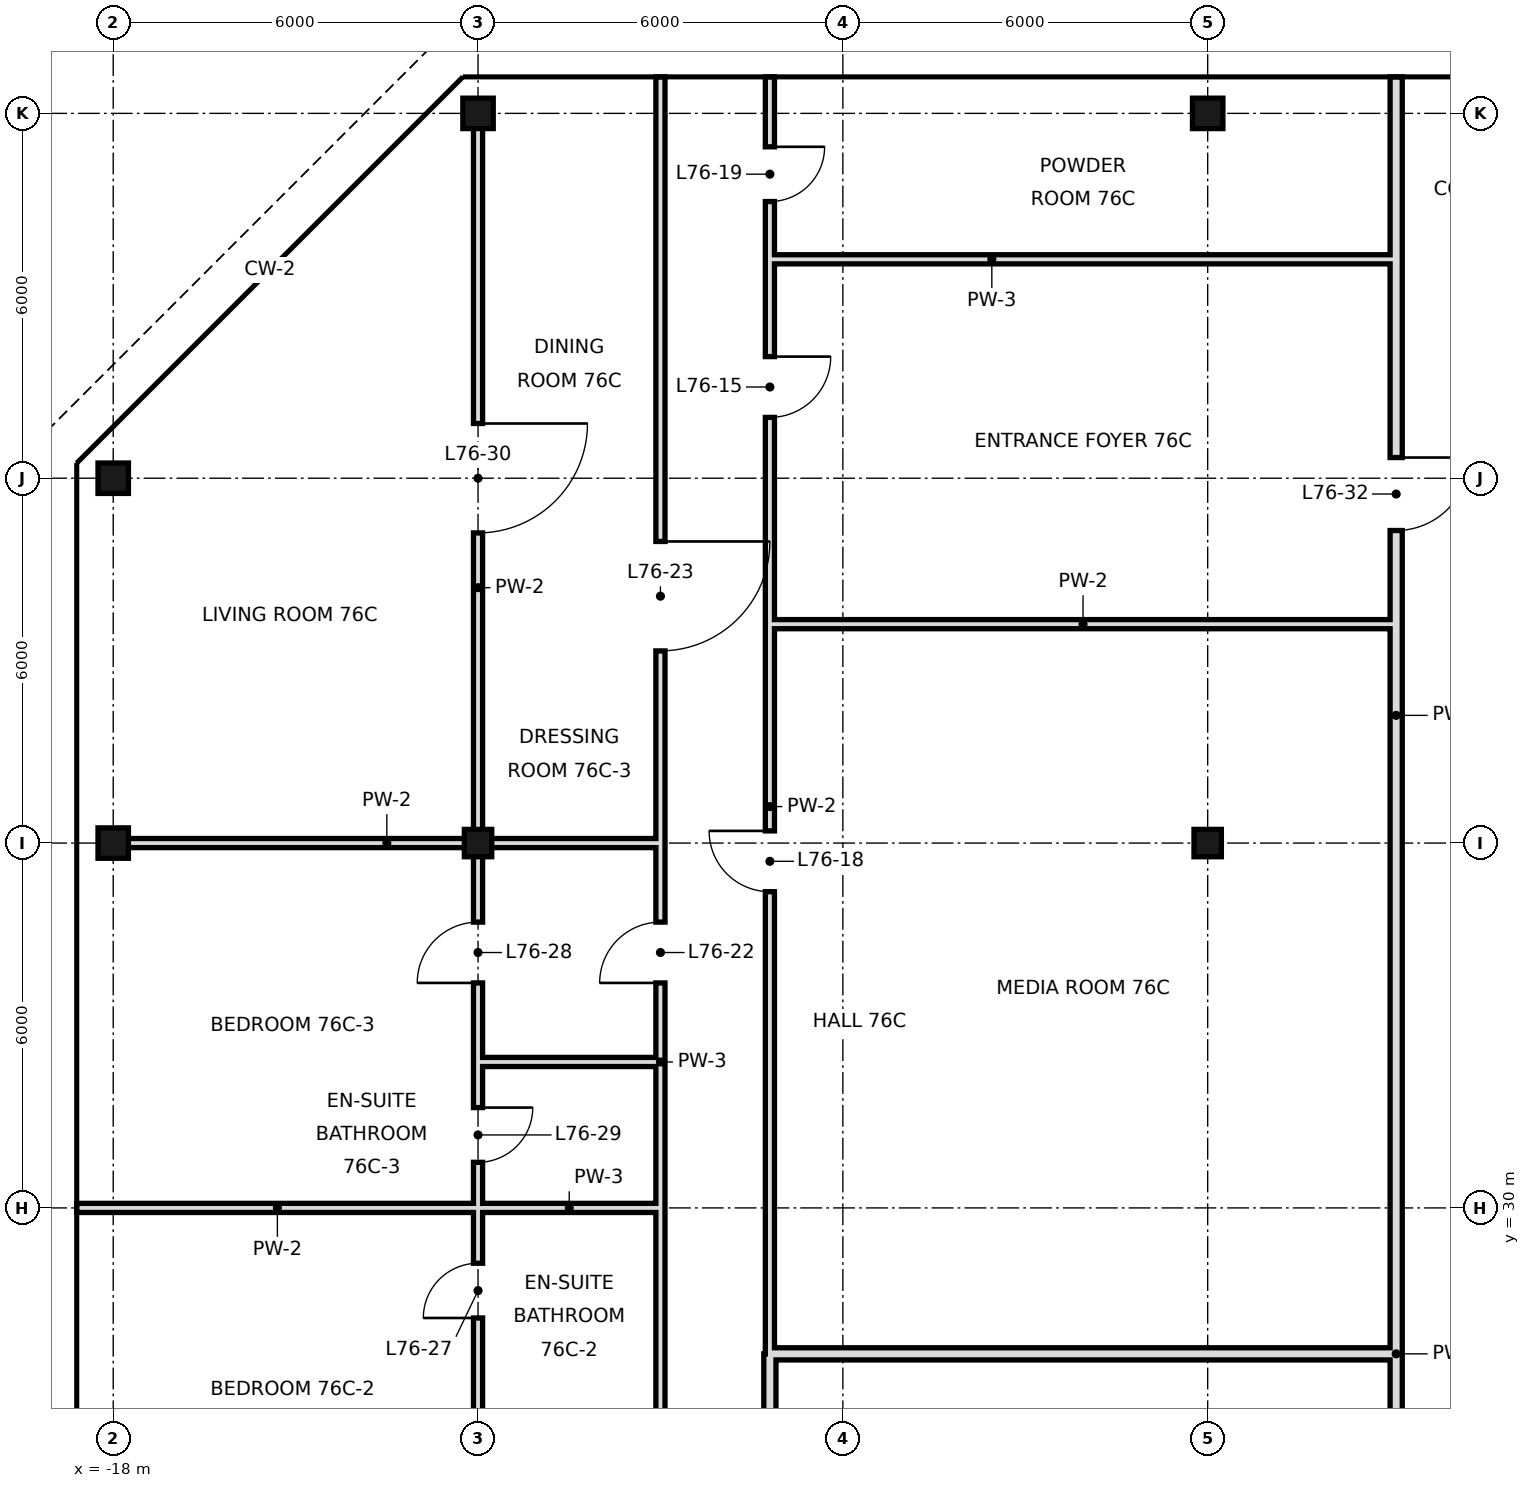
"""IFC4 building model, lengths in metres.
Left out: names, types, materials, properties, quantities, classifications, styles, units other than length and angle.
Written with IfcOpenShell. Run it as: python <this file> out.ifc"""

import sys

from ifc_helpers import new_model, si_unit, direction, frame, frame_2d, origin, origin_2d, place, context, subcontext, project, spatial, rectangle, hollow_rectangle, extrude, element, fill, save


model = new_model("IFC4")
c1 = context("Model", 3, precision=1e-05, world=origin(), true_north=direction((0.0, 1.0)))
c2 = subcontext(c1, "Body", "Model", "MODEL_VIEW")
j1 = project(units=[si_unit("LENGTHUNIT", "METRE"), si_unit("PLANEANGLEUNIT", "RADIAN")], contexts=[c1])
p1 = place(None, origin())
s1 = spatial("IfcSite", under=j1, at=p1, CompositionType="ELEMENT")
p2 = place(p1, origin())
s2 = spatial("IfcBuilding", under=s1, at=p2, CompositionType="ELEMENT")
p3 = place(p2, frame((0.0, 0.0, 319.6)))
s3 = spatial("IfcBuildingStorey", under=s2, at=p3, CompositionType="ELEMENT", Elevation=319.6)
for number, where, z_axis, x_axis in (
    (1, (-18.0, 36.0, 0.0), (0.0, 0.0, 1.0), (1.0, 0.0, 0.0)),
    (2, (-18.0, 42.0, 0.0), (0.0, 0.0, 1.0), (1.0, 0.0, 0.0)),
):
    element("IfcColumn", number, at=place(p3, frame(where, z_axis=z_axis, x_axis=x_axis)), inside=s3, PredefinedType="COLUMN", context=c2, shape_type="SweptSolid", body=[
        extrude(hollow_rectangle(XDim=0.5, YDim=0.5, WallThickness=0.025, at=origin_2d()), origin(), (0.0, 0.0, 1.0), 3.6),
    ])
p4 = place(p3, frame((-12.0, 36.0, 0.0), z_axis=(0.0, 0.0, 1.0), x_axis=(1.0, 0.0, 0.0)))
e3 = element("IfcColumn", 3, at=p4, inside=s3, PredefinedType="COLUMN", context=c2, shape_type="SweptSolid", body=[
    extrude(hollow_rectangle(XDim=0.45, YDim=0.45, WallThickness=0.022, at=origin_2d()), origin(), (0.0, 0.0, 1.0), 3.6),
])
p5 = place(p3, frame((-12.0, 48.0, 0.0), z_axis=(0.0, 0.0, 1.0), x_axis=(1.0, 0.0, 0.0)))
e4 = element("IfcColumn", 4, at=p5, inside=s3, PredefinedType="COLUMN", context=c2, shape_type="SweptSolid", body=[
    extrude(hollow_rectangle(XDim=0.5, YDim=0.5, WallThickness=0.025, at=origin_2d()), origin(), (0.0, 0.0, 1.0), 3.6),
])
p6 = place(p3, frame((0.0, 36.0, 0.0), z_axis=(0.0, 0.0, 1.0), x_axis=(1.0, 0.0, 0.0)))
e5 = element("IfcColumn", 5, at=p6, inside=s3, PredefinedType="COLUMN", context=c2, shape_type="SweptSolid", body=[
    extrude(hollow_rectangle(XDim=0.45, YDim=0.45, WallThickness=0.022, at=origin_2d()), origin(), (0.0, 0.0, 1.0), 3.6),
])
p7 = place(p3, frame((0.0, 48.0, 0.0), z_axis=(0.0, 0.0, 1.0), x_axis=(1.0, 0.0, 0.0)))
e6 = element("IfcColumn", 6, at=p7, inside=s3, PredefinedType="COLUMN", context=c2, shape_type="SweptSolid", body=[
    extrude(hollow_rectangle(XDim=0.5, YDim=0.5, WallThickness=0.025, at=origin_2d()), origin(), (0.0, 0.0, 1.0), 3.6),
])
p8 = place(p3, frame((-12.0, 32.4, 0.0), z_axis=(0.0, 0.0, 1.0), x_axis=(0.0, 1.0, 0.0)))
e7 = element("IfcWall", 7, at=p8, inside=s3, PredefinedType="PARTITIONING", context=c2, shape_type="SweptSolid", body=[
    extrude(rectangle(XDim=15.6, YDim=0.15, at=frame_2d((7.8, 0.0))), origin(), (0.0, 0.0, 1.0), 2.72),
])
p9 = place(p8, frame((1.3, 0.0, 0.0)))
e8 = element("IfcOpeningElement", 8, at=p9, cuts=e7, PredefinedType="OPENING", context=c2, shape_type="SweptSolid", body=[
    extrude(rectangle(XDim=1.0, YDim=2.4, at=frame_2d((0.5, 1.2))), frame((0.0, 0.085, 0.0), z_axis=(0.0, -1.0, 0.0), x_axis=(1.0, 0.0, 0.0)), (0.0, 0.0, 1.0), 0.17),
])
p10 = place(p8, frame((8.7, 0.0, 0.0)))
e9 = element("IfcOpeningElement", 9, at=p10, cuts=e7, PredefinedType="OPENING", context=c2, shape_type="SweptSolid", body=[
    extrude(rectangle(XDim=1.8, YDim=2.4, at=frame_2d((0.9, 1.2))), frame((0.0, 0.085, 0.0), z_axis=(0.0, -1.0, 0.0), x_axis=(1.0, 0.0, 0.0)), (0.0, 0.0, 1.0), 0.17),
])
p11 = place(p3, frame((-12.0, 26.4, 0.0), z_axis=(0.0, 0.0, 1.0), x_axis=(0.0, 1.0, 0.0)))
e10 = element("IfcWall", 10, at=p11, inside=s3, PredefinedType="PARTITIONING", context=c2, shape_type="SweptSolid", body=[
    extrude(rectangle(XDim=6.0, YDim=0.15, at=frame_2d((3.0, 0.0))), origin(), (0.0, 0.0, 1.0), 2.72),
])
p12 = place(p11, frame((1.79, 0.0, 0.0)))
e11 = element("IfcOpeningElement", 11, at=p12, cuts=e10, PredefinedType="OPENING", context=c2, shape_type="SweptSolid", body=[
    extrude(rectangle(XDim=0.9, YDim=2.4, at=frame_2d((0.45, 1.2))), frame((0.0, 0.085, 0.0), z_axis=(0.0, -1.0, 0.0), x_axis=(1.0, 0.0, 0.0)), (0.0, 0.0, 1.0), 0.17),
])
p13 = place(p11, frame((4.35, 0.0, 0.0)))
e12 = element("IfcOpeningElement", 12, at=p13, cuts=e10, PredefinedType="OPENING", context=c2, shape_type="SweptSolid", body=[
    extrude(rectangle(XDim=0.9, YDim=2.4, at=frame_2d((0.45, 1.2))), frame((0.0, 0.085, 0.0), z_axis=(0.0, -1.0, 0.0), x_axis=(1.0, 0.0, 0.0)), (0.0, 0.0, 1.0), 0.17),
])
p14 = place(p3, frame((-7.2, 23.4, 0.0), z_axis=(0.0, 0.0, 1.0), x_axis=(0.0, 1.0, 0.0)))
e13 = element("IfcWall", 13, at=p14, inside=s3, PredefinedType="SOLIDWALL", context=c2, shape_type="SweptSolid", body=[
    extrude(rectangle(XDim=4.2, YDim=0.2, at=frame_2d((2.1, 0.0))), origin(), (0.0, 0.0, 1.0), 2.72),
])
p15 = place(p14, frame((2.14, 0.0, 0.0)))
e14 = element("IfcOpeningElement", 14, at=p15, cuts=e13, PredefinedType="OPENING", context=c2, shape_type="SweptSolid", body=[
    extrude(rectangle(XDim=1.0, YDim=2.4, at=frame_2d((0.5, 1.2))), frame((0.0, 0.11, 0.0), z_axis=(0.0, -1.0, 0.0), x_axis=(1.0, 0.0, 0.0)), (0.0, 0.0, 1.0), 0.22),
])
p16 = place(p3, frame((-7.2, 27.6, 0.0), z_axis=(0.0, 0.0, 1.0), x_axis=(0.0, 1.0, 0.0)))
e15 = element("IfcWall", 15, at=p16, inside=s3, PredefinedType="PARTITIONING", context=c2, shape_type="SweptSolid", body=[
    extrude(rectangle(XDim=18.0, YDim=0.15, at=frame_2d((9.0, 0.0))), origin(), (0.0, 0.0, 1.0), 3.42),
])
p17 = place(p16, frame((15.4, 0.0, 0.0)))
e16 = element("IfcOpeningElement", 16, at=p17, cuts=e15, PredefinedType="OPENING", context=c2, shape_type="SweptSolid", body=[
    extrude(rectangle(XDim=1.0, YDim=2.4, at=frame_2d((0.5, 1.2))), frame((0.0, 0.085, 0.0), z_axis=(0.0, -1.0, 0.0), x_axis=(1.0, 0.0, 0.0)), (0.0, 0.0, 1.0), 0.17),
])
p18 = place(p16, frame((7.6, 0.0, 0.0)))
e17 = element("IfcOpeningElement", 17, at=p18, cuts=e15, PredefinedType="OPENING", context=c2, shape_type="SweptSolid", body=[
    extrude(rectangle(XDim=1.0, YDim=2.4, at=frame_2d((0.5, 1.2))), frame((0.0, 0.085, 0.0), z_axis=(0.0, -1.0, 0.0), x_axis=(1.0, 0.0, 0.0)), (0.0, 0.0, 1.0), 0.17),
])
p19 = place(p3, frame((-7.2, 45.6, 0.0), z_axis=(0.0, 0.0, 1.0), x_axis=(0.0, 1.0, 0.0)))
e18 = element("IfcWall", 18, at=p19, inside=s3, PredefinedType="PARTITIONING", context=c2, shape_type="SweptSolid", body=[
    extrude(rectangle(XDim=3.0, YDim=0.15, at=frame_2d((1.5, 0.0))), origin(), (0.0, 0.0, 1.0), 3.42),
])
p20 = place(p19, frame((0.95, 0.0, 0.0)))
e19 = element("IfcOpeningElement", 19, at=p20, cuts=e18, PredefinedType="OPENING", context=c2, shape_type="SweptSolid", body=[
    extrude(rectangle(XDim=0.9, YDim=2.4, at=frame_2d((0.45, 1.2))), frame((0.0, 0.085, 0.0), z_axis=(0.0, -1.0, 0.0), x_axis=(1.0, 0.0, 0.0)), (0.0, 0.0, 1.0), 0.17),
])
p21 = place(p3, frame((-9.0, 32.4, 0.0), z_axis=(0.0, 0.0, 1.0), x_axis=(0.0, 1.0, 0.0)))
e20 = element("IfcWall", 20, at=p21, inside=s3, PredefinedType="PARTITIONING", context=c2, shape_type="SweptSolid", body=[
    extrude(rectangle(XDim=16.2, YDim=0.15, at=frame_2d((8.1, 0.0))), origin(), (0.0, 0.0, 1.0), 3.42),
])
p22 = place(p21, frame((1.3, 0.0, 0.0)))
e21 = element("IfcOpeningElement", 21, at=p22, cuts=e20, PredefinedType="OPENING", context=c2, shape_type="SweptSolid", body=[
    extrude(rectangle(XDim=1.0, YDim=2.4, at=frame_2d((0.5, 1.2))), frame((0.0, 0.085, 0.0), z_axis=(0.0, -1.0, 0.0), x_axis=(1.0, 0.0, 0.0)), (0.0, 0.0, 1.0), 0.17),
])
p23 = place(p21, frame((6.76, 0.0, 0.0)))
e22 = element("IfcOpeningElement", 22, at=p23, cuts=e20, PredefinedType="OPENING", context=c2, shape_type="SweptSolid", body=[
    extrude(rectangle(XDim=1.8, YDim=2.4, at=frame_2d((0.9, 1.2))), frame((0.0, 0.085, 0.0), z_axis=(0.0, -1.0, 0.0), x_axis=(1.0, 0.0, 0.0)), (0.0, 0.0, 1.0), 0.17),
])
p24 = place(p3, frame((-9.0, 26.4, 0.0), z_axis=(0.0, 0.0, 1.0), x_axis=(0.0, 1.0, 0.0)))
e23 = element("IfcWall", 23, at=p24, inside=s3, PredefinedType="PARTITIONING", context=c2, shape_type="SweptSolid", body=[
    extrude(rectangle(XDim=6.0, YDim=0.15, at=frame_2d((3.0, 0.0))), origin(), (0.0, 0.0, 1.0), 3.42),
])
p25 = place(p3, frame((3.1, 27.6, 0.0), z_axis=(0.0, 0.0, 1.0), x_axis=(0.0, 1.0, 0.0)))
e24 = element("IfcWall", 24, at=p25, inside=s3, PredefinedType="SOLIDWALL", context=c2, shape_type="SweptSolid", body=[
    extrude(rectangle(XDim=21.0, YDim=0.2, at=frame_2d((10.5, 0.0))), origin(), (0.0, 0.0, 1.0), 2.72),
])
p26 = place(p25, frame((13.54, 0.0, 0.0)))
e25 = element("IfcOpeningElement", 25, at=p26, cuts=e24, PredefinedType="OPENING", context=c2, shape_type="SweptSolid", body=[
    extrude(rectangle(XDim=1.2, YDim=2.4, at=frame_2d((0.6, 1.2))), frame((0.0, 0.11, 0.0), z_axis=(0.0, -1.0, 0.0), x_axis=(1.0, 0.0, 0.0)), (0.0, 0.0, 1.0), 0.22),
])
p27 = place(p3, frame((3.1, 23.4, 0.0), z_axis=(0.0, 0.0, 1.0), x_axis=(0.0, 1.0, 0.0)))
e26 = element("IfcWall", 26, at=p27, inside=s3, PredefinedType="SOLIDWALL", context=c2, shape_type="SweptSolid", body=[
    extrude(rectangle(XDim=4.2, YDim=0.2, at=frame_2d((2.1, 0.0))), origin(), (0.0, 0.0, 1.0), 3.42),
])
p28 = place(p3, frame((-7.2, 27.6, 0.0), z_axis=(0.0, 0.0, 1.0), x_axis=(1.0, 0.0, 0.0)))
e27 = element("IfcWall", 27, at=p28, inside=s3, PredefinedType="SOLIDWALL", context=c2, shape_type="SweptSolid", body=[
    extrude(rectangle(XDim=10.3, YDim=0.2, at=frame_2d((5.15, 0.0))), origin(), (0.0, 0.0, 1.0), 2.72),
])
p29 = place(p3, frame((-18.6, 30.0, 0.0), z_axis=(0.0, 0.0, 1.0), x_axis=(1.0, 0.0, 0.0)))
e28 = element("IfcWall", 28, at=p29, inside=s3, PredefinedType="PARTITIONING", context=c2, shape_type="SweptSolid", body=[
    extrude(rectangle(XDim=6.6, YDim=0.15, at=frame_2d((3.3, 0.0))), origin(), (0.0, 0.0, 1.0), 2.97),
])
p30 = place(p3, frame((-12.0, 30.0, 0.0), z_axis=(0.0, 0.0, 1.0), x_axis=(1.0, 0.0, 0.0)))
e29 = element("IfcWall", 29, at=p30, inside=s3, PredefinedType="PARTITIONING", context=c2, shape_type="SweptSolid", body=[
    extrude(rectangle(XDim=3.0, YDim=0.15, at=frame_2d((1.5, 0.0))), origin(), (0.0, 0.0, 1.0), 2.72),
])
p31 = place(p3, frame((-12.0, 32.4, 0.0), z_axis=(0.0, 0.0, 1.0), x_axis=(1.0, 0.0, 0.0)))
e30 = element("IfcWall", 30, at=p31, inside=s3, PredefinedType="PARTITIONING", context=c2, shape_type="SweptSolid", body=[
    extrude(rectangle(XDim=3.0, YDim=0.15, at=frame_2d((1.5, 0.0))), origin(), (0.0, 0.0, 1.0), 3.42),
])
p32 = place(p3, frame((-18.0, 36.0, 0.0), z_axis=(0.0, 0.0, 1.0), x_axis=(1.0, 0.0, 0.0)))
e31 = element("IfcWall", 31, at=p32, inside=s3, PredefinedType="PARTITIONING", context=c2, shape_type="SweptSolid", body=[
    extrude(rectangle(XDim=9.0, YDim=0.15, at=frame_2d((4.5, 0.0))), origin(), (0.0, 0.0, 1.0), 2.72),
])
for number, where, z_axis, x_axis in (
    (32, (-7.2, 39.6, 0.0), (0.0, 0.0, 1.0), (1.0, 0.0, 0.0)),
    (33, (-7.2, 45.6, 0.0), (0.0, 0.0, 1.0), (1.0, 0.0, 0.0)),
):
    element("IfcWall", number, at=place(p3, frame(where, z_axis=z_axis, x_axis=x_axis)), inside=s3, PredefinedType="PARTITIONING", context=c2, shape_type="SweptSolid", body=[
        extrude(rectangle(XDim=10.3, YDim=0.15, at=frame_2d((5.15, 0.0))), origin(), (0.0, 0.0, 1.0), 3.42),
    ])
p33 = place(p17, origin())
e34 = element("IfcDoor", 34, at=p33, inside=s3, OperationType="SINGLE_SWING_RIGHT", PredefinedType="DOOR", context=c2, shape_type="SweptSolid", body=[
    extrude(rectangle(XDim=1.0, YDim=2.4, at=frame_2d((0.5, 1.2))), frame((0.0, 0.025, 0.0), z_axis=(0.0, -1.0, 0.0), x_axis=(1.0, 0.0, 0.0)), (0.0, 0.0, 1.0), 0.05),
])
fill(e16, e34)
p34 = place(p18, frame((1.0, 0.0, 0.0), z_axis=(0.0, 0.0, 1.0), x_axis=(-1.0, 0.0, 0.0)))
e35 = element("IfcDoor", 35, at=p34, inside=s3, OperationType="SINGLE_SWING_LEFT", PredefinedType="DOOR", context=c2, shape_type="SweptSolid", body=[
    extrude(rectangle(XDim=1.0, YDim=2.4, at=frame_2d((0.5, 1.2))), frame((0.0, 0.025, 0.0), z_axis=(0.0, -1.0, 0.0), x_axis=(1.0, 0.0, 0.0)), (0.0, 0.0, 1.0), 0.05),
])
fill(e17, e35)
p35 = place(p20, origin())
e36 = element("IfcDoor", 36, at=p35, inside=s3, OperationType="SINGLE_SWING_RIGHT", PredefinedType="DOOR", context=c2, shape_type="SweptSolid", body=[
    extrude(rectangle(XDim=0.9, YDim=2.4, at=frame_2d((0.45, 1.2))), frame((0.0, 0.025, 0.0), z_axis=(0.0, -1.0, 0.0), x_axis=(1.0, 0.0, 0.0)), (0.0, 0.0, 1.0), 0.05),
])
fill(e19, e36)
p36 = place(p22, origin())
e37 = element("IfcDoor", 37, at=p36, inside=s3, OperationType="SINGLE_SWING_LEFT", PredefinedType="DOOR", context=c2, shape_type="SweptSolid", body=[
    extrude(rectangle(XDim=1.0, YDim=2.4, at=frame_2d((0.5, 1.2))), frame((0.0, 0.025, 0.0), z_axis=(0.0, -1.0, 0.0), x_axis=(1.0, 0.0, 0.0)), (0.0, 0.0, 1.0), 0.05),
])
fill(e21, e37)
p37 = place(p23, origin())
e38 = element("IfcDoor", 38, at=p37, inside=s3, OperationType="SINGLE_SWING_RIGHT", PredefinedType="DOOR", context=c2, shape_type="SweptSolid", body=[
    extrude(rectangle(XDim=1.8, YDim=2.4, at=frame_2d((0.9, 1.2))), frame((0.0, 0.025, 0.0), z_axis=(0.0, -1.0, 0.0), x_axis=(1.0, 0.0, 0.0)), (0.0, 0.0, 1.0), 0.05),
])
fill(e22, e38)
p38 = place(p12, origin())
e39 = element("IfcDoor", 39, at=p38, inside=s3, OperationType="SINGLE_SWING_LEFT", PredefinedType="DOOR", context=c2, shape_type="SweptSolid", body=[
    extrude(rectangle(XDim=0.9, YDim=2.4, at=frame_2d((0.45, 1.2))), frame((0.0, 0.025, 0.0), z_axis=(0.0, -1.0, 0.0), x_axis=(1.0, 0.0, 0.0)), (0.0, 0.0, 1.0), 0.05),
])
fill(e11, e39)
p39 = place(p9, origin())
e40 = element("IfcDoor", 40, at=p39, inside=s3, OperationType="SINGLE_SWING_LEFT", PredefinedType="DOOR", context=c2, shape_type="SweptSolid", body=[
    extrude(rectangle(XDim=1.0, YDim=2.4, at=frame_2d((0.5, 1.2))), frame((0.0, 0.025, 0.0), z_axis=(0.0, -1.0, 0.0), x_axis=(1.0, 0.0, 0.0)), (0.0, 0.0, 1.0), 0.05),
])
fill(e8, e40)
p40 = place(p13, origin())
e41 = element("IfcDoor", 41, at=p40, inside=s3, OperationType="SINGLE_SWING_RIGHT", PredefinedType="DOOR", context=c2, shape_type="SweptSolid", body=[
    extrude(rectangle(XDim=0.9, YDim=2.4, at=frame_2d((0.45, 1.2))), frame((0.0, 0.025, 0.0), z_axis=(0.0, -1.0, 0.0), x_axis=(1.0, 0.0, 0.0)), (0.0, 0.0, 1.0), 0.05),
])
fill(e12, e41)
p41 = place(p10, origin())
e42 = element("IfcDoor", 42, at=p41, inside=s3, OperationType="SINGLE_SWING_RIGHT", PredefinedType="DOOR", context=c2, shape_type="SweptSolid", body=[
    extrude(rectangle(XDim=1.8, YDim=2.4, at=frame_2d((0.9, 1.2))), frame((0.0, 0.025, 0.0), z_axis=(0.0, -1.0, 0.0), x_axis=(1.0, 0.0, 0.0)), (0.0, 0.0, 1.0), 0.05),
])
fill(e9, e42)
p42 = place(p26, origin())
e43 = element("IfcDoor", 43, at=p42, inside=s3, OperationType="SINGLE_SWING_RIGHT", PredefinedType="DOOR", context=c2, shape_type="SweptSolid", body=[
    extrude(rectangle(XDim=1.2, YDim=2.4, at=frame_2d((0.6, 1.2))), frame((0.0, 0.025, 0.0), z_axis=(0.0, -1.0, 0.0), x_axis=(1.0, 0.0, 0.0)), (0.0, 0.0, 1.0), 0.05),
])
fill(e25, e43)
save(model, sys.argv[1])
